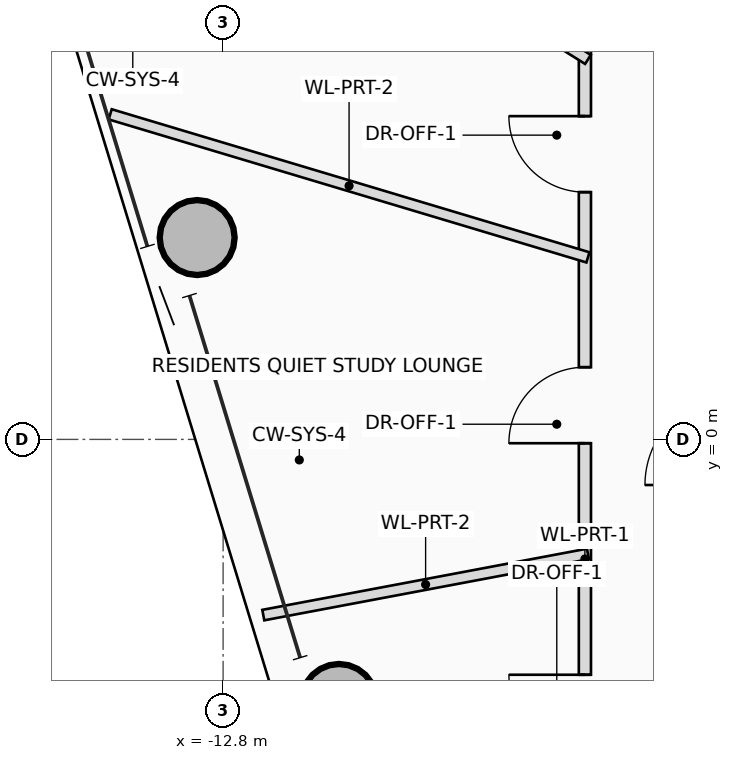
"""IFC4 building model, lengths in metres.
Left out: names, types, materials, properties, quantities, classifications, styles, units other than length and angle.
Written with IfcOpenShell. Run it as: python <this file> out.ifc"""

import sys

from ifc_helpers import new_model, si_unit, direction, frame, frame_2d, origin, origin_2d, place, context, subcontext, project, spatial, rectangle, hollow_circle, extrude, source, transform, mapped, element, fill, save


model = new_model("IFC4")
c1 = context("Model", 3, precision=1e-05, world=origin(), true_north=direction((0.0, 1.0)))
c2 = subcontext(c1, "Body", "Model", "MODEL_VIEW")
j1 = project(units=[si_unit("LENGTHUNIT", "METRE"), si_unit("PLANEANGLEUNIT", "RADIAN")], contexts=[c1])
p1 = place(None, origin())
s1 = spatial("IfcSite", under=j1, at=p1, CompositionType="ELEMENT")
p2 = place(p1, origin())
s2 = spatial("IfcBuilding", under=s1, at=p2, CompositionType="ELEMENT")
p3 = place(p2, frame((0.0, 0.0, 249.05)))
s3 = spatial("IfcBuildingStorey", under=s2, at=p3, CompositionType="ELEMENT", Elevation=249.05)
m1 = source(origin(), c2, "Body", "SweptSolid", [
    extrude(hollow_circle(Radius=0.5, WallThickness=0.04, at=origin_2d()), origin(), (0.0, 0.0, 1.0), 3.4),
])
for number, where, z_axis, x_axis in (
    (1, (-13.142, 2.656, 0.0), (0.0, 0.0, 1.0), (1.0, 0.0, 0.0)),
    (2, (-11.276, -3.448, 0.0), (0.0, 0.0, 1.0), (1.0, 0.0, 0.0)),
):
    element("IfcColumn", number, at=place(p3, frame(where, z_axis=z_axis, x_axis=x_axis)), inside=s3, PredefinedType="COLUMN", context=c2, shape_type="MappedRepresentation", body=[
        mapped(m1, transform((0.0, 0.0, 0.0), scale=1.0)),
    ])
p4 = place(p3, frame((-8.04, -5.85, 0.0), z_axis=(0.0, 0.0, 1.0), x_axis=(0.0, 1.0, 0.0)))
e3 = element("IfcWall", 3, at=p4, inside=s3, PredefinedType="PARTITIONING", context=c2, shape_type="SweptSolid", body=[
    extrude(rectangle(XDim=11.7, YDim=0.16, at=frame_2d((5.85, 0.0))), origin(), (0.0, 0.0, 1.0), 2.565),
])
p5 = place(p4, frame((1.754, 0.0, 0.0)))
e4 = element("IfcOpeningElement", 4, at=p5, cuts=e3, PredefinedType="OPENING", context=c2, shape_type="SweptSolid", body=[
    extrude(rectangle(XDim=1.0, YDim=2.25, at=frame_2d((0.5, 1.125))), frame((0.0, 0.09, 0.0), z_axis=(0.0, -1.0, 0.0), x_axis=(1.0, 0.0, 0.0)), (0.0, 0.0, 1.0), 0.18),
])
p6 = place(p4, frame((5.8, 0.0, 0.0)))
e5 = element("IfcOpeningElement", 5, at=p6, cuts=e3, PredefinedType="OPENING", context=c2, shape_type="SweptSolid", body=[
    extrude(rectangle(XDim=1.0, YDim=2.25, at=frame_2d((0.5, 1.125))), frame((0.0, 0.09, 0.0), z_axis=(0.0, -1.0, 0.0), x_axis=(1.0, 0.0, 0.0)), (0.0, 0.0, 1.0), 0.18),
])
p7 = place(p4, frame((9.103, 0.0, 0.0)))
e6 = element("IfcOpeningElement", 6, at=p7, cuts=e3, PredefinedType="OPENING", context=c2, shape_type="SweptSolid", body=[
    extrude(rectangle(XDim=1.0, YDim=2.25, at=frame_2d((0.5, 1.125))), frame((0.0, 0.09, 0.0), z_axis=(0.0, -1.0, 0.0), x_axis=(1.0, 0.0, 0.0)), (0.0, 0.0, 1.0), 0.18),
])
p8 = place(p3, frame((-8.0, 4.999, 0.0), z_axis=(0.0, 0.0, 1.0), x_axis=(-0.848044679887, 0.529924731369, 0.0)))
e7 = element("IfcWall", 7, at=p8, inside=s3, PredefinedType="PARTITIONING", context=c2, shape_type="SweptSolid", body=[
    extrude(rectangle(XDim=9.463, YDim=0.14, at=frame_2d((4.732, 0.0))), origin(), (0.0, 0.0, 1.0), 2.565),
])
p9 = place(p3, frame((-8.0, 2.395, 0.0), z_axis=(0.0, 0.0, 1.0), x_axis=(-0.957987942155, 0.286808477361, 0.0)))
e8 = element("IfcWall", 8, at=p9, inside=s3, PredefinedType="PARTITIONING", context=c2, shape_type="SweptSolid", body=[
    extrude(rectangle(XDim=6.561, YDim=0.14, at=frame_2d((3.281, 0.0))), origin(), (0.0, 0.0, 1.0), 2.565),
])
p10 = place(p3, frame((-8.0, -1.507, 0.0), z_axis=(0.0, 0.0, 1.0), x_axis=(-0.982724350189, -0.185075259138, 0.0)))
e9 = element("IfcWall", 9, at=p10, inside=s3, PredefinedType="PARTITIONING", context=c2, shape_type="SweptSolid", body=[
    extrude(rectangle(XDim=4.347, YDim=0.14, at=frame_2d((2.173, 0.0))), origin(), (0.0, 0.0, 1.0), 2.725),
])
p11 = place(p5, origin())
e10 = element("IfcDoor", 10, at=p11, inside=s3, OperationType="SINGLE_SWING_RIGHT", PredefinedType="DOOR", context=c2, shape_type="SweptSolid", body=[
    extrude(rectangle(XDim=1.0, YDim=2.25, at=frame_2d((0.5, 1.125))), frame((0.0, 0.025, 0.0), z_axis=(0.0, -1.0, 0.0), x_axis=(1.0, 0.0, 0.0)), (0.0, 0.0, 1.0), 0.05),
])
fill(e4, e10)
p12 = place(p6, origin())
e11 = element("IfcDoor", 11, at=p12, inside=s3, OperationType="SINGLE_SWING_LEFT", PredefinedType="DOOR", context=c2, shape_type="SweptSolid", body=[
    extrude(rectangle(XDim=1.0, YDim=2.25, at=frame_2d((0.5, 1.125))), frame((0.0, 0.025, 0.0), z_axis=(0.0, -1.0, 0.0), x_axis=(1.0, 0.0, 0.0)), (0.0, 0.0, 1.0), 0.05),
])
fill(e5, e11)
p13 = place(p7, origin())
e12 = element("IfcDoor", 12, at=p13, inside=s3, OperationType="SINGLE_SWING_RIGHT", PredefinedType="DOOR", context=c2, shape_type="SweptSolid", body=[
    extrude(rectangle(XDim=1.0, YDim=2.25, at=frame_2d((0.5, 1.125))), frame((0.0, 0.025, 0.0), z_axis=(0.0, -1.0, 0.0), x_axis=(1.0, 0.0, 0.0)), (0.0, 0.0, 1.0), 0.05),
])
fill(e6, e12)
save(model, sys.argv[1])
